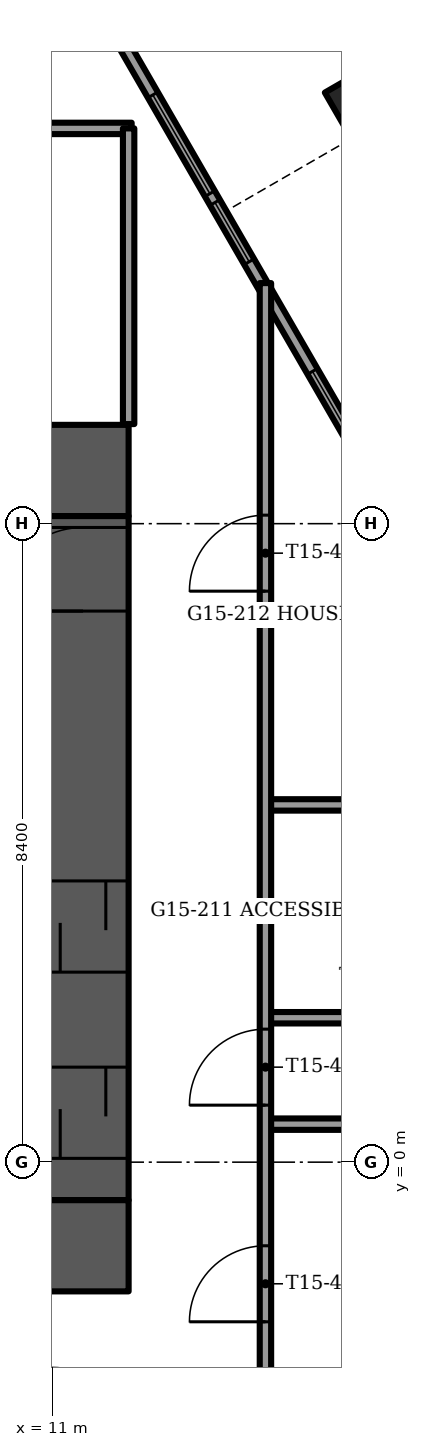
"""IFC4 building model, lengths in metres.
Left out: names, types, materials, properties, quantities, classifications, styles, units other than length and angle.
Written with IfcOpenShell. Run it as: python <this file> out.ifc"""

import sys

from ifc_helpers import new_model, si_unit, direction, frame, frame_2d, origin, origin_2d, place, context, subcontext, project, spatial, rectangle, extrude, element, fill, save


model = new_model("IFC4")
c1 = context("Model", 3, precision=1e-05, world=origin(), true_north=direction((0.0, 1.0)))
c2 = subcontext(c1, "Body", "Model", "MODEL_VIEW")
j1 = project(units=[si_unit("LENGTHUNIT", "METRE"), si_unit("PLANEANGLEUNIT", "RADIAN")], contexts=[c1])
p1 = place(None, origin())
s1 = spatial("IfcSite", under=j1, at=p1, CompositionType="ELEMENT")
p2 = place(p1, origin())
s2 = spatial("IfcBuilding", under=s1, at=p2, CompositionType="ELEMENT")
p3 = place(p2, frame((0.0, 0.0, 61.75)))
s3 = spatial("IfcBuildingStorey", under=s2, at=p3, CompositionType="ELEMENT", Elevation=61.75)
p4 = place(p3, frame((15.538, 13.815, -1.2), z_axis=(0.0, 0.0, 1.0), x_axis=(0.5, -0.866025403784, 0.0)))
e1 = element("IfcColumn", 1, at=p4, inside=s3, PredefinedType="COLUMN", context=c2, shape_type="SweptSolid", body=[
    extrude(rectangle(XDim=1.4, YDim=1.4, at=origin_2d()), origin(), (0.0, 0.0, 1.0), 3.75),
])
p5 = place(p3, frame((-12.0, -1.1, -0.3), z_axis=(0.0, 0.0, 1.0), x_axis=(1.0, 0.0, 0.0)))
e2 = element("IfcWall", 2, at=p5, inside=s3, PredefinedType="SHEAR", context=c2, shape_type="SweptSolid", body=[
    extrude(rectangle(XDim=24.0, YDim=1.2, at=frame_2d((12.0, 0.0))), origin(), (0.0, 0.0, 1.0), 3.75),
])
p6 = place(p5, frame((11.2, 0.0, 0.0)))
e3 = element("IfcOpeningElement", 3, at=p6, cuts=e2, PredefinedType="OPENING", context=c2, shape_type="SweptSolid", body=[
    extrude(rectangle(XDim=1.6, YDim=2.1, at=frame_2d((0.8, 1.05))), frame((0.0, 0.6, 0.0), z_axis=(0.0, -1.0, 0.0), x_axis=(1.0, 0.0, 0.0)), (0.0, 0.0, 1.0), 1.2),
])
p7 = place(p3, frame((-12.0, 9.1, -0.3), z_axis=(0.0, 0.0, 1.0), x_axis=(1.0, 0.0, 0.0)))
e4 = element("IfcWall", 4, at=p7, inside=s3, PredefinedType="SHEAR", context=c2, shape_type="SweptSolid", body=[
    extrude(rectangle(XDim=24.0, YDim=1.2, at=frame_2d((12.0, 0.0))), origin(), (0.0, 0.0, 1.0), 3.75),
])
p8 = place(p7, frame((11.2, 0.0, 0.0)))
e5 = element("IfcOpeningElement", 5, at=p8, cuts=e4, PredefinedType="OPENING", context=c2, shape_type="SweptSolid", body=[
    extrude(rectangle(XDim=1.6, YDim=2.1, at=frame_2d((0.8, 1.05))), frame((0.0, 0.6, 0.0), z_axis=(0.0, -1.0, 0.0), x_axis=(1.0, 0.0, 0.0)), (0.0, 0.0, 1.0), 1.2),
])
p9 = place(p7, frame((5.25, 0.0, 0.0)))
e6 = element("IfcOpeningElement", 6, at=p9, cuts=e4, PredefinedType="OPENING", context=c2, shape_type="SweptSolid", body=[
    extrude(rectangle(XDim=1.1, YDim=2.1, at=frame_2d((0.55, 1.05))), frame((0.0, 0.6, 0.0), z_axis=(0.0, -1.0, 0.0), x_axis=(1.0, 0.0, 0.0)), (0.0, 0.0, 1.0), 1.2),
])
p10 = place(p7, frame((17.65, 0.0, 0.0)))
e7 = element("IfcOpeningElement", 7, at=p10, cuts=e4, PredefinedType="OPENING", context=c2, shape_type="SweptSolid", body=[
    extrude(rectangle(XDim=1.1, YDim=2.1, at=frame_2d((0.55, 1.05))), frame((0.0, 0.6, 0.0), z_axis=(0.0, -1.0, 0.0), x_axis=(1.0, 0.0, 0.0)), (0.0, 0.0, 1.0), 1.2),
])
p11 = place(p3, frame((11.4, -0.5, -0.3), z_axis=(0.0, 0.0, 1.0), x_axis=(0.0, 1.0, 0.0)))
e8 = element("IfcWall", 8, at=p11, inside=s3, PredefinedType="SHEAR", context=c2, shape_type="SweptSolid", body=[
    extrude(rectangle(XDim=9.0, YDim=1.2, at=frame_2d((4.5, 0.0))), origin(), (0.0, 0.0, 1.0), 3.75),
])
p12 = place(p11, frame((7.75, 0.0, 0.0)))
e9 = element("IfcOpeningElement", 9, at=p12, cuts=e8, PredefinedType="OPENING", context=c2, shape_type="SweptSolid", body=[
    extrude(rectangle(XDim=1.1, YDim=2.1, at=frame_2d((0.55, 1.05))), frame((0.0, 0.6, 0.0), z_axis=(0.0, -1.0, 0.0), x_axis=(1.0, 0.0, 0.0)), (0.0, 0.0, 1.0), 1.2),
])
p13 = place(p11, frame((0.55, 0.0, 0.0)))
e10 = element("IfcOpeningElement", 10, at=p13, cuts=e8, PredefinedType="OPENING", context=c2, shape_type="SweptSolid", body=[
    extrude(rectangle(XDim=1.2, YDim=2.1, at=frame_2d((0.6, 1.05))), frame((0.0, 0.6, 0.0), z_axis=(0.0, -1.0, 0.0), x_axis=(1.0, 0.0, 0.0)), (0.0, 0.0, 1.0), 1.2),
])
p14 = place(p11, frame((3.0, 0.0, 0.0)))
e11 = element("IfcOpeningElement", 11, at=p14, cuts=e8, PredefinedType="OPENING", context=c2, shape_type="SweptSolid", body=[
    extrude(rectangle(XDim=1.2, YDim=2.1, at=frame_2d((0.6, 1.05))), frame((0.0, 0.6, 0.0), z_axis=(0.0, -1.0, 0.0), x_axis=(1.0, 0.0, 0.0)), (0.0, 0.0, 1.0), 1.2),
])
p15 = place(p3, frame((15.419, 14.521, 0.0), z_axis=(0.0, 0.0, 1.0), x_axis=(-0.500013966327, 0.866017340172, 0.0)))
e12 = element("IfcWall", 12, at=p15, inside=s3, PredefinedType="PARAPET", context=c2, shape_type="SweptSolid", body=[
    extrude(rectangle(XDim=7.129, YDim=0.9, at=frame_2d((3.564, 0.0))), origin(), (0.0, 0.0, 1.0), 1.1),
])
p16 = place(p3, frame((11.37, -17.156, 0.0), z_axis=(0.0, 0.0, 1.0), x_axis=(0.499995095024, 0.866028235655, 0.0)))
e13 = element("IfcWall", 13, at=p16, inside=s3, PredefinedType="SOLIDWALL", context=c2, shape_type="SweptSolid", body=[
    extrude(rectangle(XDim=18.345, YDim=0.15, at=frame_2d((9.172, 0.0))), origin(), (0.0, 0.0, 1.0), 3.45),
])
p17 = place(p16, frame((1.073, 0.0, 0.15)))
e14 = element("IfcOpeningElement", 14, at=p17, cuts=e13, PredefinedType="OPENING", context=c2, shape_type="SweptSolid", body=[
    extrude(rectangle(XDim=1.8, YDim=2.85, at=frame_2d((0.9, 1.425))), frame((0.0, 0.075, 0.0), z_axis=(0.0, -1.0, 0.0), x_axis=(1.0, 0.0, 0.0)), (0.0, 0.0, 1.0), 0.15),
])
p18 = place(p16, frame((3.172, 0.0, 0.0)))
e15 = element("IfcOpeningElement", 15, at=p18, cuts=e13, PredefinedType="OPENING", context=c2, shape_type="SweptSolid", body=[
    extrude(rectangle(XDim=1.5, YDim=2.4, at=frame_2d((0.75, 1.2))), frame((0.0, 0.075, 0.0), z_axis=(0.0, -1.0, 0.0), x_axis=(1.0, 0.0, 0.0)), (0.0, 0.0, 1.0), 0.15),
])
p19 = place(p16, frame((5.272, 0.0, 0.15)))
e16 = element("IfcOpeningElement", 16, at=p19, cuts=e13, PredefinedType="OPENING", context=c2, shape_type="SweptSolid", body=[
    extrude(rectangle(XDim=1.8, YDim=2.85, at=frame_2d((0.9, 1.425))), frame((0.0, 0.075, 0.0), z_axis=(0.0, -1.0, 0.0), x_axis=(1.0, 0.0, 0.0)), (0.0, 0.0, 1.0), 0.15),
])
p20 = place(p16, frame((7.372, 0.0, 0.0)))
e17 = element("IfcOpeningElement", 17, at=p20, cuts=e13, PredefinedType="OPENING", context=c2, shape_type="SweptSolid", body=[
    extrude(rectangle(XDim=1.5, YDim=2.4, at=frame_2d((0.75, 1.2))), frame((0.0, 0.075, 0.0), z_axis=(0.0, -1.0, 0.0), x_axis=(1.0, 0.0, 0.0)), (0.0, 0.0, 1.0), 0.15),
])
p21 = place(p16, frame((9.472, 0.0, 0.15)))
e18 = element("IfcOpeningElement", 18, at=p21, cuts=e13, PredefinedType="OPENING", context=c2, shape_type="SweptSolid", body=[
    extrude(rectangle(XDim=1.8, YDim=2.85, at=frame_2d((0.9, 1.425))), frame((0.0, 0.075, 0.0), z_axis=(0.0, -1.0, 0.0), x_axis=(1.0, 0.0, 0.0)), (0.0, 0.0, 1.0), 0.15),
])
p22 = place(p16, frame((11.573, 0.0, 0.0)))
e19 = element("IfcOpeningElement", 19, at=p22, cuts=e13, PredefinedType="OPENING", context=c2, shape_type="SweptSolid", body=[
    extrude(rectangle(XDim=1.5, YDim=2.4, at=frame_2d((0.75, 1.2))), frame((0.0, 0.075, 0.0), z_axis=(0.0, -1.0, 0.0), x_axis=(1.0, 0.0, 0.0)), (0.0, 0.0, 1.0), 0.15),
])
p23 = place(p16, frame((13.672, 0.0, 0.15)))
e20 = element("IfcOpeningElement", 20, at=p23, cuts=e13, PredefinedType="OPENING", context=c2, shape_type="SweptSolid", body=[
    extrude(rectangle(XDim=0.9, YDim=2.85, at=frame_2d((0.45, 1.425))), frame((0.0, 0.075, 0.0), z_axis=(0.0, -1.0, 0.0), x_axis=(1.0, 0.0, 0.0)), (0.0, 0.0, 1.0), 0.15),
])
p24 = place(p3, frame((20.543, -0.204, 0.0), z_axis=(0.0, 0.0, 1.0), x_axis=(-0.500005515081, 0.866022219628, 0.0)))
e21 = element("IfcWall", 21, at=p24, inside=s3, PredefinedType="SOLIDWALL", context=c2, shape_type="SweptSolid", body=[
    extrude(rectangle(XDim=23.667, YDim=0.15, at=frame_2d((11.833, 0.0))), origin(), (0.0, 0.0, 1.0), 3.45),
])
p25 = place(p24, frame((6.548, 0.0, 0.15)))
e22 = element("IfcOpeningElement", 22, at=p25, cuts=e21, PredefinedType="OPENING", context=c2, shape_type="SweptSolid", body=[
    extrude(rectangle(XDim=1.5, YDim=2.85, at=frame_2d((0.75, 1.425))), frame((0.0, 0.075, 0.0), z_axis=(0.0, -1.0, 0.0), x_axis=(1.0, 0.0, 0.0)), (0.0, 0.0, 1.0), 0.15),
])
p26 = place(p24, frame((8.648, 0.0, 0.15)))
e23 = element("IfcOpeningElement", 23, at=p26, cuts=e21, PredefinedType="OPENING", context=c2, shape_type="SweptSolid", body=[
    extrude(rectangle(XDim=1.8, YDim=2.85, at=frame_2d((0.9, 1.425))), frame((0.0, 0.075, 0.0), z_axis=(0.0, -1.0, 0.0), x_axis=(1.0, 0.0, 0.0)), (0.0, 0.0, 1.0), 0.15),
])
p27 = place(p24, frame((10.748, 0.0, 0.15)))
e24 = element("IfcOpeningElement", 24, at=p27, cuts=e21, PredefinedType="OPENING", context=c2, shape_type="SweptSolid", body=[
    extrude(rectangle(XDim=1.5, YDim=2.85, at=frame_2d((0.75, 1.425))), frame((0.0, 0.075, 0.0), z_axis=(0.0, -1.0, 0.0), x_axis=(1.0, 0.0, 0.0)), (0.0, 0.0, 1.0), 0.15),
])
p28 = place(p24, frame((13.914, 0.0, 0.15)))
e25 = element("IfcOpeningElement", 25, at=p28, cuts=e21, PredefinedType="OPENING", context=c2, shape_type="SweptSolid", body=[
    extrude(rectangle(XDim=0.9, YDim=2.85, at=frame_2d((0.45, 1.425))), frame((0.0, 0.075, 0.0), z_axis=(0.0, -1.0, 0.0), x_axis=(1.0, 0.0, 0.0)), (0.0, 0.0, 1.0), 0.15),
])
p29 = place(p24, frame((14.948, 0.0, 0.15)))
e26 = element("IfcOpeningElement", 26, at=p29, cuts=e21, PredefinedType="OPENING", context=c2, shape_type="SweptSolid", body=[
    extrude(rectangle(XDim=1.5, YDim=2.85, at=frame_2d((0.75, 1.425))), frame((0.0, 0.075, 0.0), z_axis=(0.0, -1.0, 0.0), x_axis=(1.0, 0.0, 0.0)), (0.0, 0.0, 1.0), 0.15),
])
p30 = place(p24, frame((19.148, 0.0, 0.0)))
e27 = element("IfcOpeningElement", 27, at=p30, cuts=e21, PredefinedType="OPENING", context=c2, shape_type="SweptSolid", body=[
    extrude(rectangle(XDim=1.5, YDim=2.4, at=frame_2d((0.75, 1.2))), frame((0.0, 0.075, 0.0), z_axis=(0.0, -1.0, 0.0), x_axis=(1.0, 0.0, 0.0)), (0.0, 0.0, 1.0), 0.15),
])
p31 = place(p24, frame((1.617, 0.0, 0.15)))
e28 = element("IfcOpeningElement", 28, at=p31, cuts=e21, PredefinedType="OPENING", context=c2, shape_type="SweptSolid", body=[
    extrude(rectangle(XDim=1.8, YDim=2.73, at=frame_2d((0.9, 1.365))), frame((0.0, 0.075, 0.0), z_axis=(0.0, -1.0, 0.0), x_axis=(1.0, 0.0, 0.0)), (0.0, 0.0, 1.0), 0.15),
])
p32 = place(p24, frame((21.458, 0.0, 0.15)))
e29 = element("IfcOpeningElement", 29, at=p32, cuts=e21, PredefinedType="OPENING", context=c2, shape_type="SweptSolid", body=[
    extrude(rectangle(XDim=1.8, YDim=2.73, at=frame_2d((0.9, 1.365))), frame((0.0, 0.075, 0.0), z_axis=(0.0, -1.0, 0.0), x_axis=(1.0, 0.0, 0.0)), (0.0, 0.0, 1.0), 0.15),
])
p33 = place(p3, frame((13.8, 0.5, 0.0), z_axis=(0.0, 0.0, 1.0), x_axis=(1.0, 0.0, 0.0)))
e30 = element("IfcWall", 30, at=p33, inside=s3, PredefinedType="PARTITIONING", context=c2, shape_type="SweptSolid", body=[
    extrude(rectangle(XDim=6.388, YDim=0.15, at=frame_2d((3.194, 0.0))), origin(), (0.0, 0.0, 1.0), 3.45),
])
p34 = place(p3, frame((13.8, 1.9, 0.0), z_axis=(0.0, 0.0, 1.0), x_axis=(1.0, 0.0, 0.0)))
e31 = element("IfcWall", 31, at=p34, inside=s3, PredefinedType="PARTITIONING", context=c2, shape_type="SweptSolid", body=[
    extrude(rectangle(XDim=3.0, YDim=0.15, at=frame_2d((1.5, 0.0))), origin(), (0.0, 0.0, 1.0), 3.45),
])
p35 = place(p34, frame((1.05, 0.0, 0.0)))
e32 = element("IfcOpeningElement", 32, at=p35, cuts=e31, PredefinedType="OPENING", context=c2, shape_type="SweptSolid", body=[
    extrude(rectangle(XDim=0.9, YDim=2.1, at=frame_2d((0.45, 1.05))), frame((0.0, 0.075, 0.0), z_axis=(0.0, -1.0, 0.0), x_axis=(1.0, 0.0, 0.0)), (0.0, 0.0, 1.0), 0.15),
])
p36 = place(p3, frame((13.8, 4.7, 0.0), z_axis=(0.0, 0.0, 1.0), x_axis=(1.0, 0.0, 0.0)))
e33 = element("IfcWall", 33, at=p36, inside=s3, PredefinedType="PARTITIONING", context=c2, shape_type="SweptSolid", body=[
    extrude(rectangle(XDim=3.963, YDim=0.15, at=frame_2d((1.981, 0.0))), origin(), (0.0, 0.0, 1.0), 3.45),
])
p37 = place(p3, frame((8.51, 13.6, 0.0), z_axis=(0.0, 0.0, 1.0), x_axis=(1.0, 0.0, 0.0)))
e34 = element("IfcWall", 34, at=p37, inside=s3, PredefinedType="PARTITIONING", context=c2, shape_type="SweptSolid", body=[
    extrude(rectangle(XDim=3.53, YDim=0.15, at=frame_2d((1.765, 0.0))), origin(), (0.0, 0.0, 1.0), 3.45),
])
p38 = place(p37, frame((1.24, 0.0, 0.0)))
e35 = element("IfcOpeningElement", 35, at=p38, cuts=e34, PredefinedType="OPENING", context=c2, shape_type="SweptSolid", body=[
    extrude(rectangle(XDim=1.0, YDim=2.1, at=frame_2d((0.5, 1.05))), frame((0.0, 0.075, 0.0), z_axis=(0.0, -1.0, 0.0), x_axis=(1.0, 0.0, 0.0)), (0.0, 0.0, 1.0), 0.15),
])
p39 = place(p3, frame((13.8, -3.7, 0.0), z_axis=(0.0, 0.0, 1.0), x_axis=(0.0, 1.0, 0.0)))
e36 = element("IfcWall", 36, at=p39, inside=s3, PredefinedType="PARTITIONING", context=c2, shape_type="SweptSolid", body=[
    extrude(rectangle(XDim=15.265, YDim=0.15, at=frame_2d((7.632, 0.0))), origin(), (0.0, 0.0, 1.0), 3.45),
])
p40 = place(p39, frame((1.6, 0.0, 0.0)))
e37 = element("IfcOpeningElement", 37, at=p40, cuts=e36, PredefinedType="OPENING", context=c2, shape_type="SweptSolid", body=[
    extrude(rectangle(XDim=1.0, YDim=2.1, at=frame_2d((0.5, 1.05))), frame((0.0, 0.075, 0.0), z_axis=(0.0, -1.0, 0.0), x_axis=(1.0, 0.0, 0.0)), (0.0, 0.0, 1.0), 0.15),
])
p41 = place(p39, frame((4.45, 0.0, 0.0)))
e38 = element("IfcOpeningElement", 38, at=p41, cuts=e36, PredefinedType="OPENING", context=c2, shape_type="SweptSolid", body=[
    extrude(rectangle(XDim=1.0, YDim=2.1, at=frame_2d((0.5, 1.05))), frame((0.0, 0.075, 0.0), z_axis=(0.0, -1.0, 0.0), x_axis=(1.0, 0.0, 0.0)), (0.0, 0.0, 1.0), 0.15),
])
p42 = place(p39, frame((11.212, 0.0, 0.0)))
e39 = element("IfcOpeningElement", 39, at=p42, cuts=e36, PredefinedType="OPENING", context=c2, shape_type="SweptSolid", body=[
    extrude(rectangle(XDim=1.0, YDim=2.1, at=frame_2d((0.5, 1.05))), frame((0.0, 0.075, 0.0), z_axis=(0.0, -1.0, 0.0), x_axis=(1.0, 0.0, 0.0)), (0.0, 0.0, 1.0), 0.15),
])
p43 = place(p3, frame((12.0, 9.71, 0.0), z_axis=(0.0, 0.0, 1.0), x_axis=(0.0, 1.0, 0.0)))
e40 = element("IfcWall", 40, at=p43, inside=s3, PredefinedType="PARTITIONING", context=c2, shape_type="SweptSolid", body=[
    extrude(rectangle(XDim=3.89, YDim=0.15, at=frame_2d((1.945, 0.0))), origin(), (0.0, 0.0, 1.0), 3.45),
])
p44 = place(p27, origin())
e41 = element("IfcWindow", 41, at=p44, inside=s3, PartitioningType="SINGLE_PANEL", PredefinedType="WINDOW", context=c2, shape_type="SweptSolid", body=[
    extrude(rectangle(XDim=1.5, YDim=2.85, at=frame_2d((0.75, 1.425))), frame((0.0, 0.03, 0.0), z_axis=(0.0, -1.0, 0.0), x_axis=(1.0, 0.0, 0.0)), (0.0, 0.0, 1.0), 0.06),
])
fill(e24, e41)
p45 = place(p28, origin())
e42 = element("IfcWindow", 42, at=p45, inside=s3, PartitioningType="SINGLE_PANEL", PredefinedType="WINDOW", context=c2, shape_type="SweptSolid", body=[
    extrude(rectangle(XDim=0.9, YDim=2.85, at=frame_2d((0.45, 1.425))), frame((0.0, 0.03, 0.0), z_axis=(0.0, -1.0, 0.0), x_axis=(1.0, 0.0, 0.0)), (0.0, 0.0, 1.0), 0.06),
])
fill(e25, e42)
p46 = place(p29, origin())
e43 = element("IfcWindow", 43, at=p46, inside=s3, PartitioningType="SINGLE_PANEL", PredefinedType="WINDOW", context=c2, shape_type="SweptSolid", body=[
    extrude(rectangle(XDim=1.5, YDim=2.85, at=frame_2d((0.75, 1.425))), frame((0.0, 0.03, 0.0), z_axis=(0.0, -1.0, 0.0), x_axis=(1.0, 0.0, 0.0)), (0.0, 0.0, 1.0), 0.06),
])
fill(e26, e43)
p47 = place(p12, origin())
e44 = element("IfcDoor", 44, at=p47, inside=s3, OperationType="SINGLE_SWING_RIGHT", PredefinedType="DOOR", context=c2, shape_type="SweptSolid", body=[
    extrude(rectangle(XDim=1.1, YDim=2.1, at=frame_2d((0.55, 1.05))), frame((0.0, 0.025, 0.0), z_axis=(0.0, -1.0, 0.0), x_axis=(1.0, 0.0, 0.0)), (0.0, 0.0, 1.0), 0.05),
])
fill(e9, e44)
p48 = place(p13, origin())
e45 = element("IfcDoor", 45, at=p48, inside=s3, OperationType="SLIDING_TO_LEFT", PredefinedType="DOOR", context=c2, shape_type="SweptSolid", body=[
    extrude(rectangle(XDim=1.2, YDim=2.1, at=frame_2d((0.6, 1.05))), frame((0.0, 0.025, 0.0), z_axis=(0.0, -1.0, 0.0), x_axis=(1.0, 0.0, 0.0)), (0.0, 0.0, 1.0), 0.05),
])
fill(e10, e45)
p49 = place(p14, origin())
e46 = element("IfcDoor", 46, at=p49, inside=s3, OperationType="SLIDING_TO_LEFT", PredefinedType="DOOR", context=c2, shape_type="SweptSolid", body=[
    extrude(rectangle(XDim=1.2, YDim=2.1, at=frame_2d((0.6, 1.05))), frame((0.0, 0.025, 0.0), z_axis=(0.0, -1.0, 0.0), x_axis=(1.0, 0.0, 0.0)), (0.0, 0.0, 1.0), 0.05),
])
fill(e11, e46)
p50 = place(p40, origin())
e47 = element("IfcDoor", 47, at=p50, inside=s3, OperationType="SINGLE_SWING_LEFT", PredefinedType="DOOR", context=c2, shape_type="SweptSolid", body=[
    extrude(rectangle(XDim=1.0, YDim=2.1, at=frame_2d((0.5, 1.05))), frame((0.0, 0.025, 0.0), z_axis=(0.0, -1.0, 0.0), x_axis=(1.0, 0.0, 0.0)), (0.0, 0.0, 1.0), 0.05),
])
fill(e37, e47)
p51 = place(p41, origin())
e48 = element("IfcDoor", 48, at=p51, inside=s3, OperationType="SINGLE_SWING_LEFT", PredefinedType="DOOR", context=c2, shape_type="SweptSolid", body=[
    extrude(rectangle(XDim=1.0, YDim=2.1, at=frame_2d((0.5, 1.05))), frame((0.0, 0.025, 0.0), z_axis=(0.0, -1.0, 0.0), x_axis=(1.0, 0.0, 0.0)), (0.0, 0.0, 1.0), 0.05),
])
fill(e38, e48)
p52 = place(p42, origin())
e49 = element("IfcDoor", 49, at=p52, inside=s3, OperationType="SINGLE_SWING_LEFT", PredefinedType="DOOR", context=c2, shape_type="SweptSolid", body=[
    extrude(rectangle(XDim=1.0, YDim=2.1, at=frame_2d((0.5, 1.05))), frame((0.0, 0.025, 0.0), z_axis=(0.0, -1.0, 0.0), x_axis=(1.0, 0.0, 0.0)), (0.0, 0.0, 1.0), 0.05),
])
fill(e39, e49)
save(model, sys.argv[1])
